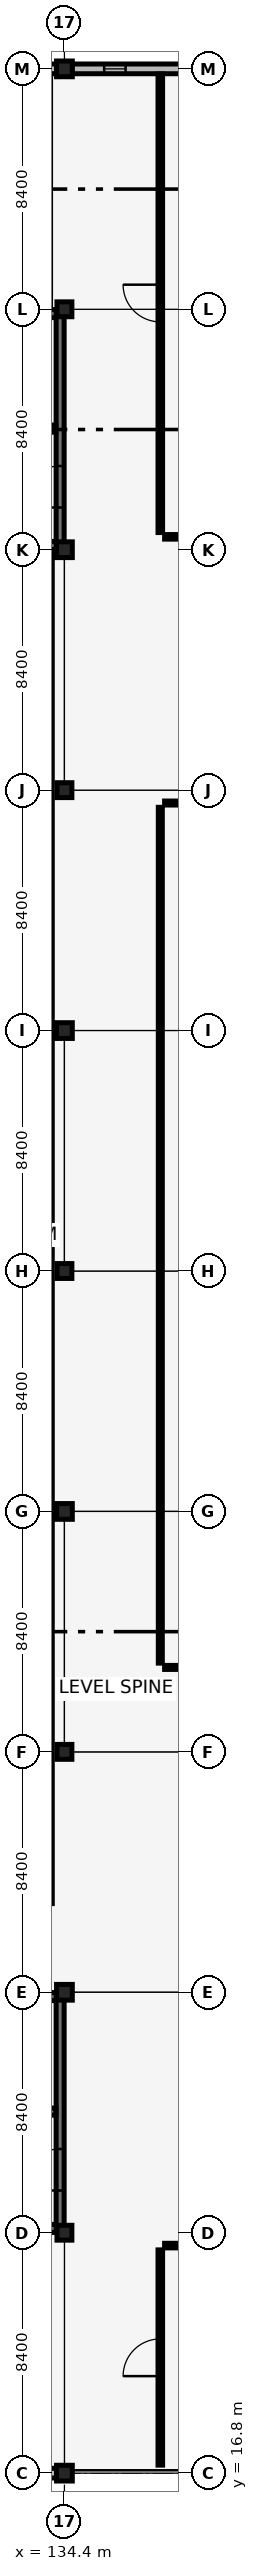
"""IFC4 building model, lengths in metres.
Left out: names, types, materials, properties, quantities, classifications, styles, units other than length and angle.
Written with IfcOpenShell. Run it as: python <this file> out.ifc"""

import sys

from ifc_helpers import new_model, si_unit, direction, frame, frame_2d, origin, origin_2d, place, context, subcontext, project, spatial, rectangle, extrude, element, fill, save


model = new_model("IFC4")
c1 = context("Model", 3, precision=1e-05, world=origin(), true_north=direction((0.0, 1.0)))
c2 = subcontext(c1, "Body", "Model", "MODEL_VIEW")
j1 = project(units=[si_unit("LENGTHUNIT", "METRE"), si_unit("PLANEANGLEUNIT", "RADIAN")], contexts=[c1])
p1 = place(None, origin())
s1 = spatial("IfcSite", under=j1, at=p1, CompositionType="ELEMENT")
p2 = place(p1, origin())
s2 = spatial("IfcBuilding", under=s1, at=p2, CompositionType="ELEMENT")
p3 = place(p2, frame((0.0, 0.0, 22.1)))
s3 = spatial("IfcBuildingStorey", under=s2, at=p3, CompositionType="ELEMENT", Elevation=22.1)
p4 = place(p3, frame((126.15, 25.35, 0.0), z_axis=(0.0, 0.0, 1.0), x_axis=(1.0, 0.0, 0.0)))
e1 = element("IfcWall", 1, at=p4, inside=s3, PredefinedType="SHEAR", context=c2, shape_type="SweptSolid", body=[
    extrude(rectangle(XDim=8.1, YDim=0.28, at=frame_2d((4.05, 0.0))), origin(), (0.0, 0.0, 1.0), 3.78),
])
p5 = place(p4, frame((0.485, 0.0, 0.0)))
e2 = element("IfcOpeningElement", 2, at=p5, cuts=e1, PredefinedType="OPENING", context=c2, shape_type="SweptSolid", body=[
    extrude(rectangle(XDim=1.0, YDim=2.15, at=frame_2d((0.5, 1.075))), frame((0.0, 0.15, 0.0), z_axis=(0.0, -1.0, 0.0), x_axis=(1.0, 0.0, 0.0)), (0.0, 0.0, 1.0), 0.3),
])
p6 = place(p3, frame((126.15, 33.45, 0.0), z_axis=(0.0, 0.0, 1.0), x_axis=(1.0, 0.0, 0.0)))
e3 = element("IfcWall", 3, at=p6, inside=s3, PredefinedType="SHEAR", context=c2, shape_type="SweptSolid", body=[
    extrude(rectangle(XDim=8.1, YDim=0.28, at=frame_2d((4.05, 0.0))), origin(), (0.0, 0.0, 1.0), 3.78),
])
p7 = place(p3, frame((134.25, 25.35, 0.0), z_axis=(0.0, 0.0, 1.0), x_axis=(0.0, 1.0, 0.0)))
e4 = element("IfcWall", 4, at=p7, inside=s3, PredefinedType="SHEAR", context=c2, shape_type="SweptSolid", body=[
    extrude(rectangle(XDim=8.1, YDim=0.28, at=frame_2d((4.05, 0.0))), origin(), (0.0, 0.0, 1.0), 3.78),
])
p8 = place(p7, frame((1.325, 0.0, 0.0)))
e5 = element("IfcOpeningElement", 5, at=p8, cuts=e4, PredefinedType="OPENING", context=c2, shape_type="SweptSolid", body=[
    extrude(rectangle(XDim=1.45, YDim=2.15, at=frame_2d((0.725, 1.075))), frame((0.0, 0.15, 0.0), z_axis=(0.0, -1.0, 0.0), x_axis=(1.0, 0.0, 0.0)), (0.0, 0.0, 1.0), 0.3),
])
p9 = place(p3, frame((126.3, 29.43, 0.0), z_axis=(0.0, 0.0, 1.0), x_axis=(1.0, 0.0, 0.0)))
e6 = element("IfcWall", 6, at=p9, inside=s3, PredefinedType="SHEAR", context=c2, shape_type="SweptSolid", body=[
    extrude(rectangle(XDim=7.8, YDim=0.25, at=frame_2d((3.9, 0.0))), origin(), (0.0, 0.0, 1.0), 3.78),
])
p10 = place(p9, frame((6.2, 0.0, 0.0)))
e7 = element("IfcOpeningElement", 7, at=p10, cuts=e6, PredefinedType="OPENING", context=c2, shape_type="SweptSolid", body=[
    extrude(rectangle(XDim=1.35, YDim=2.15, at=frame_2d((0.675, 1.075))), frame((0.0, 0.135, 0.0), z_axis=(0.0, -1.0, 0.0), x_axis=(1.0, 0.0, 0.0)), (0.0, 0.0, 1.0), 0.27),
])
p11 = place(p3, frame((126.15, 84.15, 0.0), z_axis=(0.0, 0.0, 1.0), x_axis=(1.0, 0.0, 0.0)))
e8 = element("IfcWall", 8, at=p11, inside=s3, PredefinedType="SHEAR", context=c2, shape_type="SweptSolid", body=[
    extrude(rectangle(XDim=8.1, YDim=0.28, at=frame_2d((4.05, 0.0))), origin(), (0.0, 0.0, 1.0), 3.78),
])
p12 = place(p11, frame((0.485, 0.0, 0.0)))
e9 = element("IfcOpeningElement", 9, at=p12, cuts=e8, PredefinedType="OPENING", context=c2, shape_type="SweptSolid", body=[
    extrude(rectangle(XDim=1.0, YDim=2.15, at=frame_2d((0.5, 1.075))), frame((0.0, 0.15, 0.0), z_axis=(0.0, -1.0, 0.0), x_axis=(1.0, 0.0, 0.0)), (0.0, 0.0, 1.0), 0.3),
])
p13 = place(p3, frame((126.15, 92.25, 0.0), z_axis=(0.0, 0.0, 1.0), x_axis=(1.0, 0.0, 0.0)))
e10 = element("IfcWall", 10, at=p13, inside=s3, PredefinedType="SHEAR", context=c2, shape_type="SweptSolid", body=[
    extrude(rectangle(XDim=8.1, YDim=0.28, at=frame_2d((4.05, 0.0))), origin(), (0.0, 0.0, 1.0), 3.78),
])
p14 = place(p3, frame((134.25, 84.15, 0.0), z_axis=(0.0, 0.0, 1.0), x_axis=(0.0, 1.0, 0.0)))
e11 = element("IfcWall", 11, at=p14, inside=s3, PredefinedType="SHEAR", context=c2, shape_type="SweptSolid", body=[
    extrude(rectangle(XDim=8.1, YDim=0.28, at=frame_2d((4.05, 0.0))), origin(), (0.0, 0.0, 1.0), 3.78),
])
p15 = place(p14, frame((1.325, 0.0, 0.0)))
e12 = element("IfcOpeningElement", 12, at=p15, cuts=e11, PredefinedType="OPENING", context=c2, shape_type="SweptSolid", body=[
    extrude(rectangle(XDim=1.45, YDim=2.15, at=frame_2d((0.725, 1.075))), frame((0.0, 0.15, 0.0), z_axis=(0.0, -1.0, 0.0), x_axis=(1.0, 0.0, 0.0)), (0.0, 0.0, 1.0), 0.3),
])
p16 = place(p3, frame((126.3, 88.23, 0.0), z_axis=(0.0, 0.0, 1.0), x_axis=(1.0, 0.0, 0.0)))
e13 = element("IfcWall", 13, at=p16, inside=s3, PredefinedType="SHEAR", context=c2, shape_type="SweptSolid", body=[
    extrude(rectangle(XDim=7.8, YDim=0.25, at=frame_2d((3.9, 0.0))), origin(), (0.0, 0.0, 1.0), 3.78),
])
p17 = place(p16, frame((6.2, 0.0, 0.0)))
e14 = element("IfcOpeningElement", 14, at=p17, cuts=e13, PredefinedType="OPENING", context=c2, shape_type="SweptSolid", body=[
    extrude(rectangle(XDim=1.35, YDim=2.15, at=frame_2d((0.675, 1.075))), frame((0.0, 0.135, 0.0), z_axis=(0.0, -1.0, 0.0), x_axis=(1.0, 0.0, 0.0)), (0.0, 0.0, 1.0), 0.27),
])
p18 = place(p3, frame((134.4, 16.8, 0.0), z_axis=(0.0, 0.0, 1.0), x_axis=(1.0, 0.0, 0.0)))
e15 = element("IfcColumn", 15, at=p18, inside=s3, PredefinedType="COLUMN", context=c2, shape_type="SweptSolid", body=[
    extrude(rectangle(XDim=0.55, YDim=0.55, at=origin_2d()), origin(), (0.0, 0.0, 1.0), 3.78),
])
p19 = place(p3, frame((134.4, 25.2, 0.0), z_axis=(0.0, 0.0, 1.0), x_axis=(1.0, 0.0, 0.0)))
e16 = element("IfcColumn", 16, at=p19, inside=s3, PredefinedType="COLUMN", context=c2, shape_type="SweptSolid", body=[
    extrude(rectangle(XDim=0.52, YDim=0.52, at=origin_2d()), origin(), (0.0, 0.0, 1.0), 3.78),
])
p20 = place(p3, frame((134.4, 33.6, 0.0), z_axis=(0.0, 0.0, 1.0), x_axis=(1.0, 0.0, 0.0)))
e17 = element("IfcColumn", 17, at=p20, inside=s3, PredefinedType="COLUMN", context=c2, shape_type="SweptSolid", body=[
    extrude(rectangle(XDim=0.55, YDim=0.55, at=origin_2d()), origin(), (0.0, 0.0, 1.0), 3.78),
])
p21 = place(p3, frame((134.4, 42.0, 0.0), z_axis=(0.0, 0.0, 1.0), x_axis=(1.0, 0.0, 0.0)))
e18 = element("IfcColumn", 18, at=p21, inside=s3, PredefinedType="COLUMN", context=c2, shape_type="SweptSolid", body=[
    extrude(rectangle(XDim=0.52, YDim=0.52, at=origin_2d()), origin(), (0.0, 0.0, 1.0), 3.78),
])
p22 = place(p3, frame((134.4, 50.4, 0.0), z_axis=(0.0, 0.0, 1.0), x_axis=(1.0, 0.0, 0.0)))
e19 = element("IfcColumn", 19, at=p22, inside=s3, PredefinedType="COLUMN", context=c2, shape_type="SweptSolid", body=[
    extrude(rectangle(XDim=0.55, YDim=0.55, at=origin_2d()), origin(), (0.0, 0.0, 1.0), 3.78),
])
p23 = place(p3, frame((134.4, 58.8, 0.0), z_axis=(0.0, 0.0, 1.0), x_axis=(1.0, 0.0, 0.0)))
e20 = element("IfcColumn", 20, at=p23, inside=s3, PredefinedType="COLUMN", context=c2, shape_type="SweptSolid", body=[
    extrude(rectangle(XDim=0.52, YDim=0.52, at=origin_2d()), origin(), (0.0, 0.0, 1.0), 3.78),
])
p24 = place(p3, frame((134.4, 67.2, 0.0), z_axis=(0.0, 0.0, 1.0), x_axis=(1.0, 0.0, 0.0)))
e21 = element("IfcColumn", 21, at=p24, inside=s3, PredefinedType="COLUMN", context=c2, shape_type="SweptSolid", body=[
    extrude(rectangle(XDim=0.55, YDim=0.55, at=origin_2d()), origin(), (0.0, 0.0, 1.0), 3.78),
])
p25 = place(p3, frame((134.4, 75.6, 0.0), z_axis=(0.0, 0.0, 1.0), x_axis=(1.0, 0.0, 0.0)))
e22 = element("IfcColumn", 22, at=p25, inside=s3, PredefinedType="COLUMN", context=c2, shape_type="SweptSolid", body=[
    extrude(rectangle(XDim=0.52, YDim=0.52, at=origin_2d()), origin(), (0.0, 0.0, 1.0), 3.78),
])
p26 = place(p3, frame((134.4, 84.0, 0.0), z_axis=(0.0, 0.0, 1.0), x_axis=(1.0, 0.0, 0.0)))
e23 = element("IfcColumn", 23, at=p26, inside=s3, PredefinedType="COLUMN", context=c2, shape_type="SweptSolid", body=[
    extrude(rectangle(XDim=0.55, YDim=0.55, at=origin_2d()), origin(), (0.0, 0.0, 1.0), 3.78),
])
p27 = place(p3, frame((134.4, 92.4, 0.0), z_axis=(0.0, 0.0, 1.0), x_axis=(1.0, 0.0, 0.0)))
e24 = element("IfcColumn", 24, at=p27, inside=s3, PredefinedType="COLUMN", context=c2, shape_type="SweptSolid", body=[
    extrude(rectangle(XDim=0.52, YDim=0.52, at=origin_2d()), origin(), (0.0, 0.0, 1.0), 3.78),
])
p28 = place(p3, frame((134.4, 100.8, 0.0), z_axis=(0.0, 0.0, 1.0), x_axis=(1.0, 0.0, 0.0)))
e25 = element("IfcColumn", 25, at=p28, inside=s3, PredefinedType="COLUMN", context=c2, shape_type="SweptSolid", body=[
    extrude(rectangle(XDim=0.55, YDim=0.55, at=origin_2d()), origin(), (0.0, 0.0, 1.0), 3.78),
])
p29 = place(p3, frame((126.235, 16.8, 0.0), z_axis=(0.0, 0.0, 1.0), x_axis=(1.0, 0.0, 0.0)))
e26 = element("IfcWall", 26, at=p29, inside=s3, PredefinedType="SOLIDWALL", context=c2, shape_type="SweptSolid", body=[
    extrude(rectangle(XDim=7.905, YDim=0.34, at=frame_2d((3.952, 0.0))), origin(), (0.0, 0.0, 1.0), 3.18),
])
p30 = place(p29, frame((1.127, 0.0, 0.7)))
e27 = element("IfcOpeningElement", 27, at=p30, cuts=e26, PredefinedType="OPENING", context=c2, shape_type="SweptSolid", body=[
    extrude(rectangle(XDim=0.75, YDim=2.1, at=frame_2d((0.375, 1.05))), frame((0.0, 0.18, 0.0), z_axis=(0.0, -1.0, 0.0), x_axis=(1.0, 0.0, 0.0)), (0.0, 0.0, 1.0), 0.36),
])
p31 = place(p29, frame((2.708, 0.0, 0.7)))
e28 = element("IfcOpeningElement", 28, at=p31, cuts=e26, PredefinedType="OPENING", context=c2, shape_type="SweptSolid", body=[
    extrude(rectangle(XDim=0.75, YDim=2.1, at=frame_2d((0.375, 1.05))), frame((0.0, 0.18, 0.0), z_axis=(0.0, -1.0, 0.0), x_axis=(1.0, 0.0, 0.0)), (0.0, 0.0, 1.0), 0.36),
])
p32 = place(p29, frame((4.447, 0.0, 0.7)))
e29 = element("IfcOpeningElement", 29, at=p32, cuts=e26, PredefinedType="OPENING", context=c2, shape_type="SweptSolid", body=[
    extrude(rectangle(XDim=0.75, YDim=2.1, at=frame_2d((0.375, 1.05))), frame((0.0, 0.18, 0.0), z_axis=(0.0, -1.0, 0.0), x_axis=(1.0, 0.0, 0.0)), (0.0, 0.0, 1.0), 0.36),
])
p33 = place(p29, frame((6.028, 0.0, 0.7)))
e30 = element("IfcOpeningElement", 30, at=p33, cuts=e26, PredefinedType="OPENING", context=c2, shape_type="SweptSolid", body=[
    extrude(rectangle(XDim=0.75, YDim=2.1, at=frame_2d((0.375, 1.05))), frame((0.0, 0.18, 0.0), z_axis=(0.0, -1.0, 0.0), x_axis=(1.0, 0.0, 0.0)), (0.0, 0.0, 1.0), 0.36),
])
p34 = place(p3, frame((126.235, 100.8, 0.0), z_axis=(0.0, 0.0, 1.0), x_axis=(1.0, 0.0, 0.0)))
e31 = element("IfcWall", 31, at=p34, inside=s3, PredefinedType="SOLIDWALL", context=c2, shape_type="SweptSolid", body=[
    extrude(rectangle(XDim=7.905, YDim=0.34, at=frame_2d((3.952, 0.0))), origin(), (0.0, 0.0, 1.0), 3.18),
])
p35 = place(p34, frame((1.127, 0.0, 0.7)))
e32 = element("IfcOpeningElement", 32, at=p35, cuts=e31, PredefinedType="OPENING", context=c2, shape_type="SweptSolid", body=[
    extrude(rectangle(XDim=0.75, YDim=2.1, at=frame_2d((0.375, 1.05))), frame((0.0, 0.18, 0.0), z_axis=(0.0, -1.0, 0.0), x_axis=(1.0, 0.0, 0.0)), (0.0, 0.0, 1.0), 0.36),
])
p36 = place(p34, frame((2.708, 0.0, 0.7)))
e33 = element("IfcOpeningElement", 33, at=p36, cuts=e31, PredefinedType="OPENING", context=c2, shape_type="SweptSolid", body=[
    extrude(rectangle(XDim=0.75, YDim=2.1, at=frame_2d((0.375, 1.05))), frame((0.0, 0.18, 0.0), z_axis=(0.0, -1.0, 0.0), x_axis=(1.0, 0.0, 0.0)), (0.0, 0.0, 1.0), 0.36),
])
p37 = place(p34, frame((4.447, 0.0, 0.7)))
e34 = element("IfcOpeningElement", 34, at=p37, cuts=e31, PredefinedType="OPENING", context=c2, shape_type="SweptSolid", body=[
    extrude(rectangle(XDim=0.75, YDim=2.1, at=frame_2d((0.375, 1.05))), frame((0.0, 0.18, 0.0), z_axis=(0.0, -1.0, 0.0), x_axis=(1.0, 0.0, 0.0)), (0.0, 0.0, 1.0), 0.36),
])
p38 = place(p34, frame((6.028, 0.0, 0.7)))
e35 = element("IfcOpeningElement", 35, at=p38, cuts=e31, PredefinedType="OPENING", context=c2, shape_type="SweptSolid", body=[
    extrude(rectangle(XDim=0.75, YDim=2.1, at=frame_2d((0.375, 1.05))), frame((0.0, 0.18, 0.0), z_axis=(0.0, -1.0, 0.0), x_axis=(1.0, 0.0, 0.0)), (0.0, 0.0, 1.0), 0.36),
])
p39 = place(p3, frame((134.66, 100.8, 0.0), z_axis=(0.0, 0.0, 1.0), x_axis=(1.0, 0.0, 0.0)))
e36 = element("IfcWall", 36, at=p39, inside=s3, PredefinedType="SOLIDWALL", context=c2, shape_type="SweptSolid", body=[
    extrude(rectangle(XDim=7.905, YDim=0.34, at=frame_2d((3.953, 0.0))), origin(), (0.0, 0.0, 1.0), 3.18),
])
p40 = place(p39, frame((1.127, 0.0, 0.7)))
e37 = element("IfcOpeningElement", 37, at=p40, cuts=e36, PredefinedType="OPENING", context=c2, shape_type="SweptSolid", body=[
    extrude(rectangle(XDim=0.75, YDim=2.1, at=frame_2d((0.375, 1.05))), frame((0.0, 0.18, 0.0), z_axis=(0.0, -1.0, 0.0), x_axis=(1.0, 0.0, 0.0)), (0.0, 0.0, 1.0), 0.36),
])
p41 = place(p39, frame((4.447, 0.0, 0.7)))
e38 = element("IfcOpeningElement", 38, at=p41, cuts=e36, PredefinedType="OPENING", context=c2, shape_type="SweptSolid", body=[
    extrude(rectangle(XDim=0.75, YDim=2.1, at=frame_2d((0.375, 1.05))), frame((0.0, 0.18, 0.0), z_axis=(0.0, -1.0, 0.0), x_axis=(1.0, 0.0, 0.0)), (0.0, 0.0, 1.0), 0.36),
])
p42 = place(p39, frame((6.028, 0.0, 0.7)))
e39 = element("IfcOpeningElement", 39, at=p42, cuts=e36, PredefinedType="OPENING", context=c2, shape_type="SweptSolid", body=[
    extrude(rectangle(XDim=0.75, YDim=2.1, at=frame_2d((0.375, 1.05))), frame((0.0, 0.18, 0.0), z_axis=(0.0, -1.0, 0.0), x_axis=(1.0, 0.0, 0.0)), (0.0, 0.0, 1.0), 0.36),
])
p43 = place(p3, frame((137.75, 17.08, 0.0), z_axis=(0.0, 0.0, 1.0), x_axis=(0.0, 1.0, 0.0)))
e40 = element("IfcWall", 40, at=p43, inside=s3, PredefinedType="PARTITIONING", context=c2, shape_type="SweptSolid", body=[
    extrude(rectangle(XDim=7.52, YDim=0.16, at=frame_2d((3.76, 0.0))), origin(), (0.0, 0.0, 1.0), 3.18),
])
p44 = place(p43, frame((3.11, 0.0, 0.0)))
e41 = element("IfcOpeningElement", 41, at=p44, cuts=e40, PredefinedType="OPENING", context=c2, shape_type="SweptSolid", body=[
    extrude(rectangle(XDim=1.3, YDim=2.2, at=frame_2d((0.65, 1.1))), frame((0.0, 0.09, 0.0), z_axis=(0.0, -1.0, 0.0), x_axis=(1.0, 0.0, 0.0)), (0.0, 0.0, 1.0), 0.18),
])
p45 = place(p3, frame((137.9, 24.75, 0.0), z_axis=(0.0, 0.0, 1.0), x_axis=(1.0, 0.0, 0.0)))
e42 = element("IfcWall", 42, at=p45, inside=s3, PredefinedType="PARTITIONING", context=c2, shape_type="SweptSolid", body=[
    extrude(rectangle(XDim=29.82, YDim=0.16, at=frame_2d((14.91, 0.0))), origin(), (0.0, 0.0, 1.0), 3.13),
])
p46 = place(p3, frame((137.9, 44.95, 0.0), z_axis=(0.0, 0.0, 1.0), x_axis=(1.0, 0.0, 0.0)))
e43 = element("IfcWall", 43, at=p46, inside=s3, PredefinedType="PARTITIONING", context=c2, shape_type="SweptSolid", body=[
    extrude(rectangle(XDim=21.05, YDim=0.14, at=frame_2d((10.525, 0.0))), origin(), (0.0, 0.0, 1.0), 3.13),
])
p47 = place(p46, frame((10.05, 0.0, 0.0)))
e44 = element("IfcOpeningElement", 44, at=p47, cuts=e43, PredefinedType="OPENING", context=c2, shape_type="SweptSolid", body=[
    extrude(rectangle(XDim=0.95, YDim=2.1, at=frame_2d((0.475, 1.05))), frame((0.0, 0.08, 0.0), z_axis=(0.0, -1.0, 0.0), x_axis=(1.0, 0.0, 0.0)), (0.0, 0.0, 1.0), 0.16),
])
p48 = place(p3, frame((137.9, 75.15, 0.0), z_axis=(0.0, 0.0, 1.0), x_axis=(1.0, 0.0, 0.0)))
e45 = element("IfcWall", 45, at=p48, inside=s3, PredefinedType="PARTITIONING", context=c2, shape_type="SweptSolid", body=[
    extrude(rectangle(XDim=21.05, YDim=0.14, at=frame_2d((10.525, 0.0))), origin(), (0.0, 0.0, 1.0), 3.13),
])
p49 = place(p3, frame((137.75, 45.1, 0.0), z_axis=(0.0, 0.0, 1.0), x_axis=(0.0, 1.0, 0.0)))
e46 = element("IfcWall", 46, at=p49, inside=s3, PredefinedType="PARTITIONING", context=c2, shape_type="SweptSolid", body=[
    extrude(rectangle(XDim=29.9, YDim=0.14, at=frame_2d((14.95, 0.0))), origin(), (0.0, 0.0, 1.0), 3.08),
])
p50 = place(p3, frame((137.75, 84.6, 0.0), z_axis=(0.0, 0.0, 1.0), x_axis=(0.0, 1.0, 0.0)))
e47 = element("IfcWall", 47, at=p50, inside=s3, PredefinedType="PARTITIONING", context=c2, shape_type="SweptSolid", body=[
    extrude(rectangle(XDim=16.02, YDim=0.16, at=frame_2d((8.01, 0.0))), origin(), (0.0, 0.0, 1.0), 3.16),
])
p51 = place(p50, frame((7.36, 0.0, 0.0)))
e48 = element("IfcOpeningElement", 48, at=p51, cuts=e47, PredefinedType="OPENING", context=c2, shape_type="SweptSolid", body=[
    extrude(rectangle(XDim=1.3, YDim=2.2, at=frame_2d((0.65, 1.1))), frame((0.0, 0.09, 0.0), z_axis=(0.0, -1.0, 0.0), x_axis=(1.0, 0.0, 0.0)), (0.0, 0.0, 1.0), 0.18),
])
p52 = place(p3, frame((137.9, 84.45, 0.0), z_axis=(0.0, 0.0, 1.0), x_axis=(1.0, 0.0, 0.0)))
e49 = element("IfcWall", 49, at=p52, inside=s3, PredefinedType="PARTITIONING", context=c2, shape_type="SweptSolid", body=[
    extrude(rectangle(XDim=29.82, YDim=0.16, at=frame_2d((14.91, 0.0))), origin(), (0.0, 0.0, 1.0), 3.13),
])
p53 = place(p40, origin())
e50 = element("IfcWindow", 50, at=p53, inside=s3, PartitioningType="DOUBLE_PANEL_VERTICAL", PredefinedType="WINDOW", context=c2, shape_type="SweptSolid", body=[
    extrude(rectangle(XDim=0.75, YDim=2.1, at=frame_2d((0.375, 1.05))), frame((0.0, 0.03, 0.0), z_axis=(0.0, -1.0, 0.0), x_axis=(1.0, 0.0, 0.0)), (0.0, 0.0, 1.0), 0.06),
])
fill(e37, e50)
p54 = place(p8, origin())
e51 = element("IfcDoor", 51, at=p54, inside=s3, OperationType="DOUBLE_DOOR_SINGLE_SWING", PredefinedType="DOOR", context=c2, shape_type="SweptSolid", body=[
    extrude(rectangle(XDim=1.45, YDim=2.15, at=frame_2d((0.725, 1.075))), frame((0.0, 0.025, 0.0), z_axis=(0.0, -1.0, 0.0), x_axis=(1.0, 0.0, 0.0)), (0.0, 0.0, 1.0), 0.05),
])
fill(e5, e51)
p55 = place(p15, origin())
e52 = element("IfcDoor", 52, at=p55, inside=s3, OperationType="DOUBLE_DOOR_SINGLE_SWING", PredefinedType="DOOR", context=c2, shape_type="SweptSolid", body=[
    extrude(rectangle(XDim=1.45, YDim=2.15, at=frame_2d((0.725, 1.075))), frame((0.0, 0.025, 0.0), z_axis=(0.0, -1.0, 0.0), x_axis=(1.0, 0.0, 0.0)), (0.0, 0.0, 1.0), 0.05),
])
fill(e12, e52)
p56 = place(p44, origin())
e53 = element("IfcDoor", 53, at=p56, inside=s3, OperationType="SINGLE_SWING_LEFT", PredefinedType="DOOR", context=c2, shape_type="SweptSolid", body=[
    extrude(rectangle(XDim=1.3, YDim=2.2, at=frame_2d((0.65, 1.1))), frame((0.0, 0.025, 0.0), z_axis=(0.0, -1.0, 0.0), x_axis=(1.0, 0.0, 0.0)), (0.0, 0.0, 1.0), 0.05),
])
fill(e41, e53)
p57 = place(p51, origin())
e54 = element("IfcDoor", 54, at=p57, inside=s3, OperationType="SINGLE_SWING_RIGHT", PredefinedType="DOOR", context=c2, shape_type="SweptSolid", body=[
    extrude(rectangle(XDim=1.3, YDim=2.2, at=frame_2d((0.65, 1.1))), frame((0.0, 0.025, 0.0), z_axis=(0.0, -1.0, 0.0), x_axis=(1.0, 0.0, 0.0)), (0.0, 0.0, 1.0), 0.05),
])
fill(e48, e54)
save(model, sys.argv[1])
